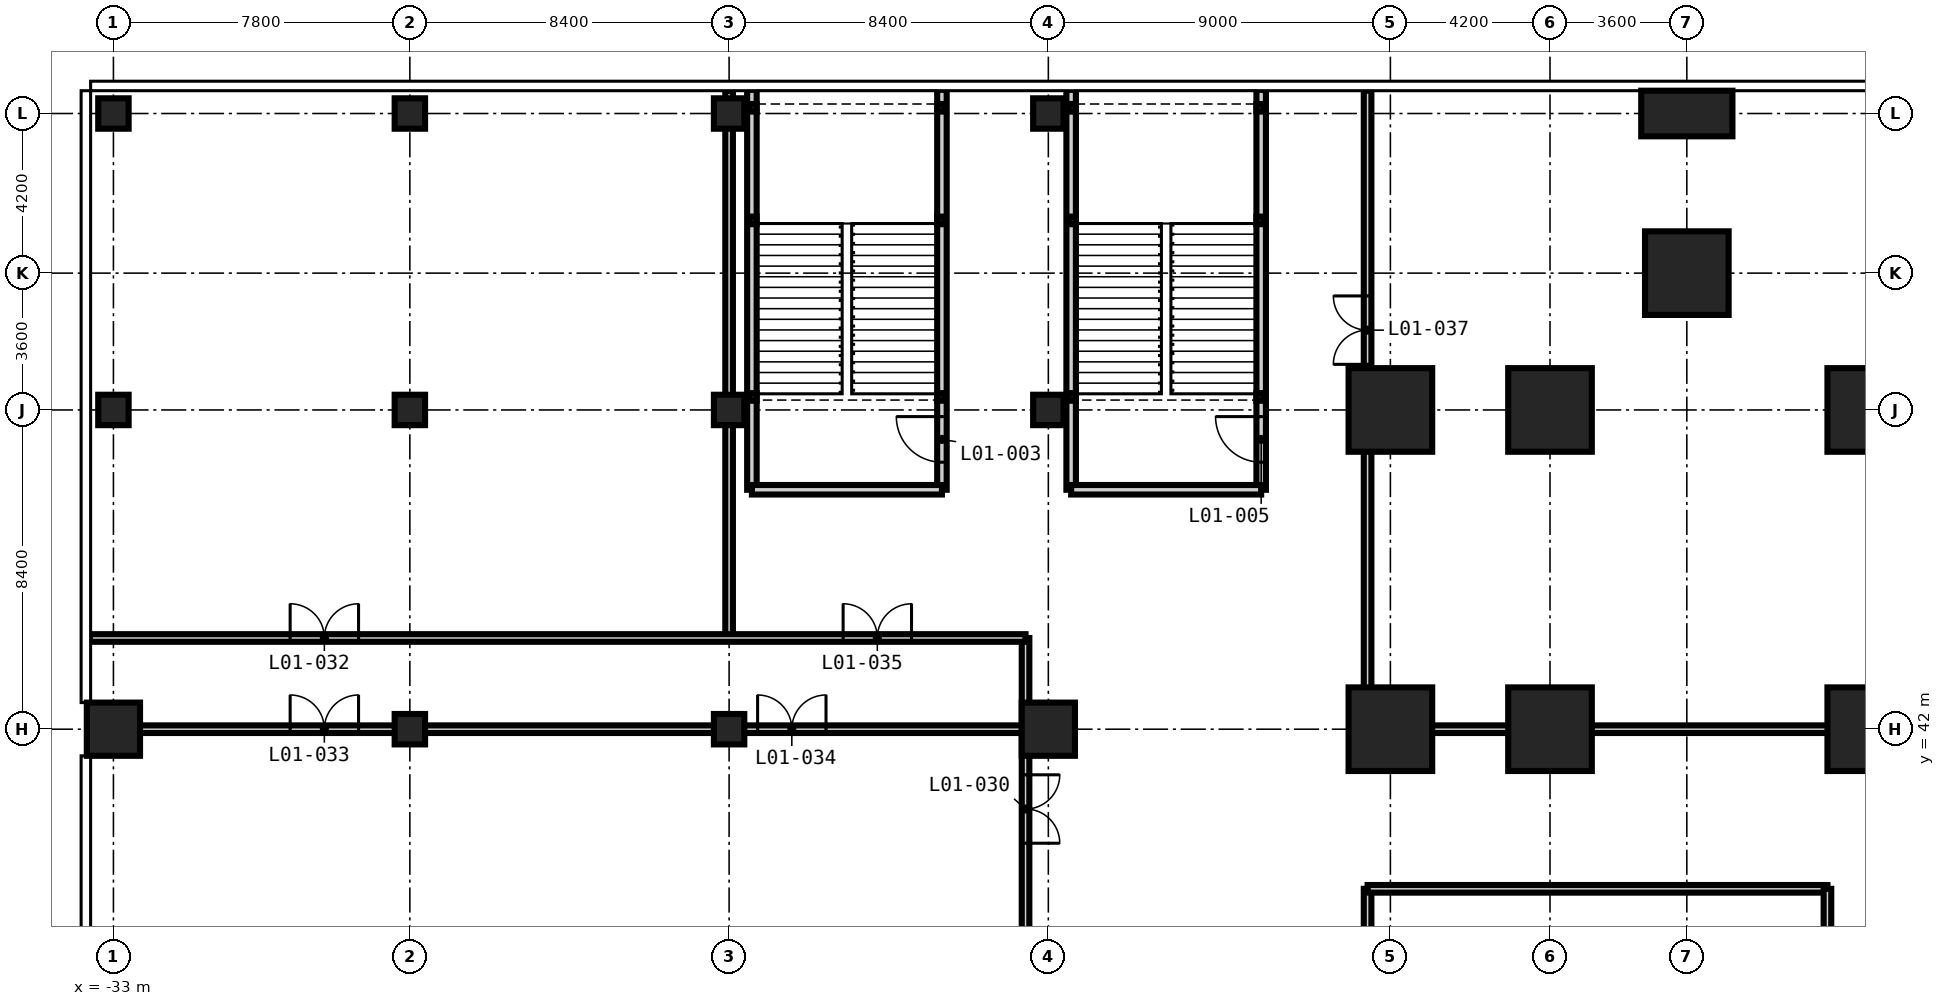
"""IFC4 building model, lengths in metres.
Left out: names, types, materials, properties, quantities, classifications, styles, units other than length and angle.
Written with IfcOpenShell. Run it as: python <this file> out.ifc"""

import sys

from ifc_helpers import new_model, si_unit, direction, frame, frame_2d, origin, origin_2d, place, context, subcontext, project, spatial, rectangle, hollow_rectangle, extrude, element, fill, save


model = new_model("IFC4")
c1 = context("Model", 3, precision=1e-05, world=origin(), true_north=direction((0.0, 1.0)))
c2 = subcontext(c1, "Body", "Model", "MODEL_VIEW")
j1 = project(units=[si_unit("LENGTHUNIT", "METRE"), si_unit("PLANEANGLEUNIT", "RADIAN")], contexts=[c1])
p1 = place(None, origin())
s1 = spatial("IfcSite", under=j1, at=p1, CompositionType="ELEMENT")
p2 = place(p1, origin())
s2 = spatial("IfcBuilding", under=s1, at=p2, CompositionType="ELEMENT")
p3 = place(p2, frame((0.0, 0.0, 6.0)))
s3 = spatial("IfcBuildingStorey", under=s2, at=p3, CompositionType="ELEMENT", Elevation=6.0)
for number, where, z_axis, x_axis in (
    (1, (0.6, 42.0, -0.3), (0.0, 0.0, 1.0), (1.0, 0.0, 0.0)),
    (2, (0.6, 50.4, -0.3), (0.0, 0.0, 1.0), (1.0, 0.0, 0.0)),
    (3, (4.8, 42.0, -0.3), (0.0, 0.0, 1.0), (1.0, 0.0, 0.0)),
    (4, (4.8, 50.4, -0.3), (0.0, 0.0, 1.0), (1.0, 0.0, 0.0)),
    (5, (8.4, 54.0, -0.3), (0.0, 0.0, 1.0), (1.0, 0.0, 0.0)),
):
    element("IfcColumn", number, at=place(p3, frame(where, z_axis=z_axis, x_axis=x_axis)), inside=s3, PredefinedType="COLUMN", context=c2, shape_type="SweptSolid", body=[
        extrude(rectangle(XDim=2.2, YDim=2.2, at=origin_2d()), origin(), (0.0, 0.0, 1.0), 6.0),
    ])
p4 = place(p3, frame((8.4, 58.2, -0.3), z_axis=(0.0, 0.0, 1.0), x_axis=(1.0, 0.0, 0.0)))
e6 = element("IfcColumn", 6, at=p4, inside=s3, PredefinedType="COLUMN", context=c2, shape_type="SweptSolid", body=[
    extrude(rectangle(XDim=2.4, YDim=1.2, at=origin_2d()), origin(), (0.0, 0.0, 1.0), 6.0),
])
for number, where, z_axis, x_axis in (
    (7, (13.2, 42.0, -0.3), (0.0, 0.0, 1.0), (1.0, 0.0, 0.0)),
    (8, (13.2, 50.4, -0.3), (0.0, 0.0, 1.0), (1.0, 0.0, 0.0)),
):
    element("IfcColumn", number, at=place(p3, frame(where, z_axis=z_axis, x_axis=x_axis)), inside=s3, PredefinedType="COLUMN", context=c2, shape_type="SweptSolid", body=[
        extrude(rectangle(XDim=2.2, YDim=2.2, at=origin_2d()), origin(), (0.0, 0.0, 1.0), 6.0),
    ])
p5 = place(p3, frame((-33.0, 42.0, -0.3), z_axis=(0.0, 0.0, 1.0), x_axis=(1.0, 0.0, 0.0)))
e9 = element("IfcColumn", 9, at=p5, inside=s3, PredefinedType="COLUMN", context=c2, shape_type="SweptSolid", body=[
    extrude(rectangle(XDim=1.4, YDim=1.4, at=origin_2d()), origin(), (0.0, 0.0, 1.0), 6.0),
])
for number, where, z_axis, x_axis in (
    (10, (-33.0, 50.4, -0.3), (0.0, 0.0, 1.0), (1.0, 0.0, 0.0)),
    (11, (-33.0, 58.2, -0.3), (0.0, 0.0, 1.0), (1.0, 0.0, 0.0)),
    (12, (-25.2, 42.0, -0.3), (0.0, 0.0, 1.0), (1.0, 0.0, 0.0)),
    (13, (-25.2, 50.4, -0.3), (0.0, 0.0, 1.0), (1.0, 0.0, 0.0)),
    (14, (-25.2, 58.2, -0.3), (0.0, 0.0, 1.0), (1.0, 0.0, 0.0)),
    (15, (-16.8, 42.0, -0.3), (0.0, 0.0, 1.0), (1.0, 0.0, 0.0)),
    (16, (-16.8, 50.4, -0.3), (0.0, 0.0, 1.0), (1.0, 0.0, 0.0)),
    (17, (-16.8, 58.2, -0.3), (0.0, 0.0, 1.0), (1.0, 0.0, 0.0)),
):
    element("IfcColumn", number, at=place(p3, frame(where, z_axis=z_axis, x_axis=x_axis)), inside=s3, PredefinedType="COLUMN", context=c2, shape_type="SweptSolid", body=[
        extrude(rectangle(XDim=0.8, YDim=0.8, at=origin_2d()), origin(), (0.0, 0.0, 1.0), 6.0),
    ])
p6 = place(p3, frame((-8.4, 42.0, -0.3), z_axis=(0.0, 0.0, 1.0), x_axis=(1.0, 0.0, 0.0)))
e18 = element("IfcColumn", 18, at=p6, inside=s3, PredefinedType="COLUMN", context=c2, shape_type="SweptSolid", body=[
    extrude(rectangle(XDim=1.4, YDim=1.4, at=origin_2d()), origin(), (0.0, 0.0, 1.0), 6.0),
])
for number, where, z_axis, x_axis in (
    (19, (-8.4, 50.4, -0.3), (0.0, 0.0, 1.0), (1.0, 0.0, 0.0)),
    (20, (-8.4, 58.2, -0.3), (0.0, 0.0, 1.0), (1.0, 0.0, 0.0)),
):
    element("IfcColumn", number, at=place(p3, frame(where, z_axis=z_axis, x_axis=x_axis)), inside=s3, PredefinedType="COLUMN", context=c2, shape_type="SweptSolid", body=[
        extrude(rectangle(XDim=0.8, YDim=0.8, at=origin_2d()), origin(), (0.0, 0.0, 1.0), 6.0),
    ])
p7 = place(p3, frame((-16.8, 44.4, 0.0), z_axis=(0.0, 0.0, 1.0), x_axis=(0.0, 1.0, 0.0)))
e21 = element("IfcWall", 21, at=p7, inside=s3, PredefinedType="PARTITIONING", context=c2, shape_type="SweptSolid", body=[
    extrude(rectangle(XDim=14.4, YDim=0.2, at=frame_2d((7.2, 0.0))), origin(), (0.0, 0.0, 1.0), 5.7),
])
p8 = place(p3, frame((-9.0, 42.0, 0.0), z_axis=(0.0, 0.0, 1.0), x_axis=(0.0, 1.0, 0.0)))
e22 = element("IfcWall", 22, at=p8, inside=s3, PredefinedType="PARTITIONING", context=c2, shape_type="SweptSolid", body=[
    extrude(rectangle(XDim=2.4, YDim=0.2, at=frame_2d((1.2, 0.0))), origin(), (0.0, 0.0, 1.0), 5.7),
])
p9 = place(p3, frame((0.0, 12.6, 0.0), z_axis=(0.0, 0.0, 1.0), x_axis=(0.0, 1.0, 0.0)))
e23 = element("IfcWall", 23, at=p9, inside=s3, PredefinedType="PARTITIONING", context=c2, shape_type="SweptSolid", body=[
    extrude(rectangle(XDim=25.2, YDim=0.2, at=frame_2d((12.6, 0.0))), origin(), (0.0, 0.0, 1.0), 5.7),
])
p10 = place(p9, frame((7.65, 0.0, 0.0)))
e24 = element("IfcOpeningElement", 24, at=p10, cuts=e23, PredefinedType="OPENING", context=c2, shape_type="SweptSolid", body=[
    extrude(rectangle(XDim=0.9, YDim=2.1, at=frame_2d((0.45, 1.05))), frame((0.0, 0.11, 0.0), z_axis=(0.0, -1.0, 0.0), x_axis=(1.0, 0.0, 0.0)), (0.0, 0.0, 1.0), 0.22),
])
p11 = place(p9, frame((10.4, 0.0, 0.0)))
e25 = element("IfcOpeningElement", 25, at=p11, cuts=e23, PredefinedType="OPENING", context=c2, shape_type="SweptSolid", body=[
    extrude(rectangle(XDim=1.0, YDim=2.1, at=frame_2d((0.5, 1.05))), frame((0.0, 0.11, 0.0), z_axis=(0.0, -1.0, 0.0), x_axis=(1.0, 0.0, 0.0)), (0.0, 0.0, 1.0), 0.22),
])
p12 = place(p9, frame((18.0, 0.0, 0.0)))
e26 = element("IfcOpeningElement", 26, at=p12, cuts=e23, PredefinedType="OPENING", context=c2, shape_type="SweptSolid", body=[
    extrude(rectangle(XDim=1.8, YDim=2.4, at=frame_2d((0.9, 1.2))), frame((0.0, 0.11, 0.0), z_axis=(0.0, -1.0, 0.0), x_axis=(1.0, 0.0, 0.0)), (0.0, 0.0, 1.0), 0.22),
])
p13 = place(p3, frame((0.0, 42.0, 0.0), z_axis=(0.0, 0.0, 1.0), x_axis=(0.0, 1.0, 0.0)))
e27 = element("IfcWall", 27, at=p13, inside=s3, PredefinedType="PARTITIONING", context=c2, shape_type="SweptSolid", body=[
    extrude(rectangle(XDim=16.8, YDim=0.2, at=frame_2d((8.4, 0.0))), origin(), (0.0, 0.0, 1.0), 5.7),
])
p14 = place(p13, frame((9.6, 0.0, 0.0)))
e28 = element("IfcOpeningElement", 28, at=p14, cuts=e27, PredefinedType="OPENING", context=c2, shape_type="SweptSolid", body=[
    extrude(rectangle(XDim=1.8, YDim=2.4, at=frame_2d((0.9, 1.2))), frame((0.0, 0.11, 0.0), z_axis=(0.0, -1.0, 0.0), x_axis=(1.0, 0.0, 0.0)), (0.0, 0.0, 1.0), 0.22),
])
p15 = place(p3, frame((0.0, 37.8, 0.0), z_axis=(0.0, 0.0, 1.0), x_axis=(1.0, 0.0, 0.0)))
e29 = element("IfcWall", 29, at=p15, inside=s3, PredefinedType="PARTITIONING", context=c2, shape_type="SweptSolid", body=[
    extrude(rectangle(XDim=12.1, YDim=0.2, at=frame_2d((6.05, 0.0))), origin(), (0.0, 0.0, 1.0), 5.7),
])
p16 = place(p3, frame((-33.6, 42.0, 0.0), z_axis=(0.0, 0.0, 1.0), x_axis=(1.0, 0.0, 0.0)))
e30 = element("IfcWall", 30, at=p16, inside=s3, PredefinedType="PARTITIONING", context=c2, shape_type="SweptSolid", body=[
    extrude(rectangle(XDim=24.6, YDim=0.2, at=frame_2d((12.3, 0.0))), origin(), (0.0, 0.0, 1.0), 5.7),
])
p17 = place(p16, frame((5.25, 0.0, 0.0)))
e31 = element("IfcOpeningElement", 31, at=p17, cuts=e30, PredefinedType="OPENING", context=c2, shape_type="SweptSolid", body=[
    extrude(rectangle(XDim=1.8, YDim=2.4, at=frame_2d((0.9, 1.2))), frame((0.0, 0.11, 0.0), z_axis=(0.0, -1.0, 0.0), x_axis=(1.0, 0.0, 0.0)), (0.0, 0.0, 1.0), 0.22),
])
p18 = place(p16, frame((17.55, 0.0, 0.0)))
e32 = element("IfcOpeningElement", 32, at=p18, cuts=e30, PredefinedType="OPENING", context=c2, shape_type="SweptSolid", body=[
    extrude(rectangle(XDim=1.8, YDim=2.4, at=frame_2d((0.9, 1.2))), frame((0.0, 0.11, 0.0), z_axis=(0.0, -1.0, 0.0), x_axis=(1.0, 0.0, 0.0)), (0.0, 0.0, 1.0), 0.22),
])
p19 = place(p3, frame((-33.623, 44.4, 0.0), z_axis=(0.0, 0.0, 1.0), x_axis=(1.0, 0.0, 0.0)))
e33 = element("IfcWall", 33, at=p19, inside=s3, PredefinedType="PARTITIONING", context=c2, shape_type="SweptSolid", body=[
    extrude(rectangle(XDim=24.623, YDim=0.2, at=frame_2d((12.312, 0.0))), origin(), (0.0, 0.0, 1.0), 5.7),
])
p20 = place(p19, frame((5.273, 0.0, 0.0)))
e34 = element("IfcOpeningElement", 34, at=p20, cuts=e33, PredefinedType="OPENING", context=c2, shape_type="SweptSolid", body=[
    extrude(rectangle(XDim=1.8, YDim=2.4, at=frame_2d((0.9, 1.2))), frame((0.0, 0.11, 0.0), z_axis=(0.0, -1.0, 0.0), x_axis=(1.0, 0.0, 0.0)), (0.0, 0.0, 1.0), 0.22),
])
p21 = place(p19, frame((19.823, 0.0, 0.0)))
e35 = element("IfcOpeningElement", 35, at=p21, cuts=e33, PredefinedType="OPENING", context=c2, shape_type="SweptSolid", body=[
    extrude(rectangle(XDim=1.8, YDim=2.4, at=frame_2d((0.9, 1.2))), frame((0.0, 0.11, 0.0), z_axis=(0.0, -1.0, 0.0), x_axis=(1.0, 0.0, 0.0)), (0.0, 0.0, 1.0), 0.22),
])
p22 = place(p3, frame((-9.0, 42.0, 0.0), z_axis=(0.0, 0.0, 1.0), x_axis=(0.0, -1.0, 0.0)))
e36 = element("IfcWall", 36, at=p22, inside=s3, PredefinedType="PARTITIONING", context=c2, shape_type="SweptSolid", body=[
    extrude(rectangle(XDim=33.6, YDim=0.2, at=frame_2d((16.8, 0.0))), origin(), (0.0, 0.0, 1.0), 5.7),
])
p23 = place(p22, frame((17.6, 0.0, 0.0)))
e37 = element("IfcOpeningElement", 37, at=p23, cuts=e36, PredefinedType="OPENING", context=c2, shape_type="SweptSolid", body=[
    extrude(rectangle(XDim=1.8, YDim=2.4, at=frame_2d((0.9, 1.2))), frame((0.0, 0.11, 0.0), z_axis=(0.0, -1.0, 0.0), x_axis=(1.0, 0.0, 0.0)), (0.0, 0.0, 1.0), 0.22),
])
p24 = place(p22, frame((1.2, 0.0, 0.0)))
e38 = element("IfcOpeningElement", 38, at=p24, cuts=e36, PredefinedType="OPENING", context=c2, shape_type="SweptSolid", body=[
    extrude(rectangle(XDim=1.8, YDim=2.4, at=frame_2d((0.9, 1.2))), frame((0.0, 0.11, 0.0), z_axis=(0.0, -1.0, 0.0), x_axis=(1.0, 0.0, 0.0)), (0.0, 0.0, 1.0), 0.22),
])
p25 = place(p22, frame((30.6, 0.0, 0.0)))
e39 = element("IfcOpeningElement", 39, at=p25, cuts=e36, PredefinedType="OPENING", context=c2, shape_type="SweptSolid", body=[
    extrude(rectangle(XDim=1.8, YDim=2.4, at=frame_2d((0.9, 1.2))), frame((0.0, 0.11, 0.0), z_axis=(0.0, -1.0, 0.0), x_axis=(1.0, 0.0, 0.0)), (0.0, 0.0, 1.0), 0.22),
])
p26 = place(p3, frame((12.1, 37.8, 0.0), z_axis=(0.0, 0.0, 1.0), x_axis=(0.0, -1.0, 0.0)))
e40 = element("IfcWall", 40, at=p26, inside=s3, PredefinedType="PARTITIONING", context=c2, shape_type="SweptSolid", body=[
    extrude(rectangle(XDim=12.6, YDim=0.2, at=frame_2d((6.3, 0.0))), origin(), (0.0, 0.0, 1.0), 5.7),
])
p27 = place(p3, frame((15.3, 42.0, 0.0), z_axis=(0.0, 0.0, 1.0), x_axis=(-1.0, 0.0, 0.0)))
e41 = element("IfcWall", 41, at=p27, inside=s3, PredefinedType="PARTITIONING", context=c2, shape_type="SweptSolid", body=[
    extrude(rectangle(XDim=15.3, YDim=0.2, at=frame_2d((7.65, 0.0))), origin(), (0.0, 0.0, 1.0), 5.7),
])
p28 = place(p3, frame((-16.2, 48.3, 0.0), z_axis=(0.0, 0.0, 1.0), x_axis=(0.0, 1.0, 0.0)))
e42 = element("IfcWall", 42, at=p28, inside=s3, PredefinedType="PARTITIONING", context=c2, shape_type="SweptSolid", body=[
    extrude(rectangle(XDim=10.523, YDim=0.25, at=frame_2d((5.261, 0.0))), origin(), (0.0, 0.0, 1.0), 5.7),
])
p29 = place(p3, frame((-11.2, 48.3, 0.0), z_axis=(0.0, 0.0, 1.0), x_axis=(0.0, 1.0, 0.0)))
e43 = element("IfcWall", 43, at=p29, inside=s3, PredefinedType="PARTITIONING", context=c2, shape_type="SweptSolid", body=[
    extrude(rectangle(XDim=10.523, YDim=0.25, at=frame_2d((5.261, 0.0))), origin(), (0.0, 0.0, 1.0), 5.7),
])
p30 = place(p29, frame((0.725, 0.0, 0.0)))
e44 = element("IfcOpeningElement", 44, at=p30, cuts=e43, PredefinedType="OPENING", context=c2, shape_type="SweptSolid", body=[
    extrude(rectangle(XDim=1.2, YDim=2.2, at=frame_2d((0.6, 1.1))), frame((0.0, 0.135, 0.0), z_axis=(0.0, -1.0, 0.0), x_axis=(1.0, 0.0, 0.0)), (0.0, 0.0, 1.0), 0.27),
])
p31 = place(p3, frame((-7.8, 48.3, 0.0), z_axis=(0.0, 0.0, 1.0), x_axis=(0.0, 1.0, 0.0)))
e45 = element("IfcWall", 45, at=p31, inside=s3, PredefinedType="PARTITIONING", context=c2, shape_type="SweptSolid", body=[
    extrude(rectangle(XDim=10.523, YDim=0.25, at=frame_2d((5.261, 0.0))), origin(), (0.0, 0.0, 1.0), 5.7),
])
p32 = place(p3, frame((-2.8, 48.3, 0.0), z_axis=(0.0, 0.0, 1.0), x_axis=(0.0, 1.0, 0.0)))
e46 = element("IfcWall", 46, at=p32, inside=s3, PredefinedType="PARTITIONING", context=c2, shape_type="SweptSolid", body=[
    extrude(rectangle(XDim=10.523, YDim=0.25, at=frame_2d((5.261, 0.0))), origin(), (0.0, 0.0, 1.0), 5.7),
])
p33 = place(p32, frame((0.725, 0.0, 0.0)))
e47 = element("IfcOpeningElement", 47, at=p33, cuts=e46, PredefinedType="OPENING", context=c2, shape_type="SweptSolid", body=[
    extrude(rectangle(XDim=1.2, YDim=2.2, at=frame_2d((0.6, 1.1))), frame((0.0, 0.135, 0.0), z_axis=(0.0, -1.0, 0.0), x_axis=(1.0, 0.0, 0.0)), (0.0, 0.0, 1.0), 0.27),
])
for number, where, z_axis, x_axis in (
    (48, (-16.2, 48.3, 0.0), (0.0, 0.0, 1.0), (1.0, 0.0, 0.0)),
    (49, (-7.8, 48.3, 0.0), (0.0, 0.0, 1.0), (1.0, 0.0, 0.0)),
):
    element("IfcWall", number, at=place(p3, frame(where, z_axis=z_axis, x_axis=x_axis)), inside=s3, PredefinedType="PARTITIONING", context=c2, shape_type="SweptSolid", body=[
        extrude(rectangle(XDim=5.0, YDim=0.25, at=frame_2d((2.5, 0.0))), origin(), (0.0, 0.0, 1.0), 5.7),
    ])
for number, where, z_axis, x_axis in (
    (50, (-16.175, 50.742, -0.3), (0.0, 0.0, 1.0), (1.0, 0.0, 0.0)),
    (51, (-11.225, 50.742, -0.3), (0.0, 0.0, 1.0), (1.0, 0.0, 0.0)),
    (52, (-16.175, 55.387, -0.3), (0.0, 0.0, 1.0), (1.0, 0.0, 0.0)),
    (53, (-11.225, 55.387, -0.3), (0.0, 0.0, 1.0), (1.0, 0.0, 0.0)),
    (54, (-16.175, 58.35, -0.3), (0.0, 0.0, 1.0), (1.0, 0.0, 0.0)),
    (55, (-11.225, 58.35, -0.3), (0.0, 0.0, 1.0), (1.0, 0.0, 0.0)),
    (56, (-7.775, 50.742, -0.3), (0.0, 0.0, 1.0), (1.0, 0.0, 0.0)),
    (57, (-2.825, 50.742, -0.3), (0.0, 0.0, 1.0), (1.0, 0.0, 0.0)),
    (58, (-7.775, 55.387, -0.3), (0.0, 0.0, 1.0), (1.0, 0.0, 0.0)),
    (59, (-2.825, 55.387, -0.3), (0.0, 0.0, 1.0), (1.0, 0.0, 0.0)),
    (60, (-7.775, 58.35, -0.3), (0.0, 0.0, 1.0), (1.0, 0.0, 0.0)),
    (61, (-2.825, 58.35, -0.3), (0.0, 0.0, 1.0), (1.0, 0.0, 0.0)),
):
    element("IfcColumn", number, at=place(p3, frame(where, z_axis=z_axis, x_axis=x_axis)), inside=s3, PredefinedType="COLUMN", context=c2, shape_type="SweptSolid", body=[
        extrude(hollow_rectangle(XDim=0.2, YDim=0.2, WallThickness=0.01, at=origin_2d()), origin(), (0.0, 0.0, 1.0), 6.0),
    ])
p34 = place(p30, origin())
e62 = element("IfcDoor", 62, at=p34, inside=s3, OperationType="SINGLE_SWING_RIGHT", PredefinedType="DOOR", context=c2, shape_type="SweptSolid", body=[
    extrude(rectangle(XDim=1.2, YDim=2.2, at=frame_2d((0.6, 1.1))), frame((0.0, 0.025, 0.0), z_axis=(0.0, -1.0, 0.0), x_axis=(1.0, 0.0, 0.0)), (0.0, 0.0, 1.0), 0.05),
])
fill(e44, e62)
p35 = place(p33, origin())
e63 = element("IfcDoor", 63, at=p35, inside=s3, OperationType="SINGLE_SWING_RIGHT", PredefinedType="DOOR", context=c2, shape_type="SweptSolid", body=[
    extrude(rectangle(XDim=1.2, YDim=2.2, at=frame_2d((0.6, 1.1))), frame((0.0, 0.025, 0.0), z_axis=(0.0, -1.0, 0.0), x_axis=(1.0, 0.0, 0.0)), (0.0, 0.0, 1.0), 0.05),
])
fill(e47, e63)
p36 = place(p24, origin())
e64 = element("IfcDoor", 64, at=p36, inside=s3, OperationType="DOUBLE_DOOR_DOUBLE_SWING", PredefinedType="DOOR", context=c2, shape_type="SweptSolid", body=[
    extrude(rectangle(XDim=1.8, YDim=2.4, at=frame_2d((0.9, 1.2))), frame((0.0, 0.025, 0.0), z_axis=(0.0, -1.0, 0.0), x_axis=(1.0, 0.0, 0.0)), (0.0, 0.0, 1.0), 0.05),
])
fill(e38, e64)
p37 = place(p20, origin())
e65 = element("IfcDoor", 65, at=p37, inside=s3, OperationType="DOUBLE_DOOR_DOUBLE_SWING", PredefinedType="DOOR", context=c2, shape_type="SweptSolid", body=[
    extrude(rectangle(XDim=1.8, YDim=2.4, at=frame_2d((0.9, 1.2))), frame((0.0, 0.025, 0.0), z_axis=(0.0, -1.0, 0.0), x_axis=(1.0, 0.0, 0.0)), (0.0, 0.0, 1.0), 0.05),
])
fill(e34, e65)
p38 = place(p17, origin())
e66 = element("IfcDoor", 66, at=p38, inside=s3, OperationType="DOUBLE_DOOR_DOUBLE_SWING", PredefinedType="DOOR", context=c2, shape_type="SweptSolid", body=[
    extrude(rectangle(XDim=1.8, YDim=2.4, at=frame_2d((0.9, 1.2))), frame((0.0, 0.025, 0.0), z_axis=(0.0, -1.0, 0.0), x_axis=(1.0, 0.0, 0.0)), (0.0, 0.0, 1.0), 0.05),
])
fill(e31, e66)
p39 = place(p18, origin())
e67 = element("IfcDoor", 67, at=p39, inside=s3, OperationType="DOUBLE_DOOR_DOUBLE_SWING", PredefinedType="DOOR", context=c2, shape_type="SweptSolid", body=[
    extrude(rectangle(XDim=1.8, YDim=2.4, at=frame_2d((0.9, 1.2))), frame((0.0, 0.025, 0.0), z_axis=(0.0, -1.0, 0.0), x_axis=(1.0, 0.0, 0.0)), (0.0, 0.0, 1.0), 0.05),
])
fill(e32, e67)
p40 = place(p21, origin())
e68 = element("IfcDoor", 68, at=p40, inside=s3, OperationType="DOUBLE_DOOR_DOUBLE_SWING", PredefinedType="DOOR", context=c2, shape_type="SweptSolid", body=[
    extrude(rectangle(XDim=1.8, YDim=2.4, at=frame_2d((0.9, 1.2))), frame((0.0, 0.025, 0.0), z_axis=(0.0, -1.0, 0.0), x_axis=(1.0, 0.0, 0.0)), (0.0, 0.0, 1.0), 0.05),
])
fill(e35, e68)
p41 = place(p14, origin())
e69 = element("IfcDoor", 69, at=p41, inside=s3, OperationType="DOUBLE_DOOR_DOUBLE_SWING", PredefinedType="DOOR", context=c2, shape_type="SweptSolid", body=[
    extrude(rectangle(XDim=1.8, YDim=2.4, at=frame_2d((0.9, 1.2))), frame((0.0, 0.025, 0.0), z_axis=(0.0, -1.0, 0.0), x_axis=(1.0, 0.0, 0.0)), (0.0, 0.0, 1.0), 0.05),
])
fill(e28, e69)
save(model, sys.argv[1])
